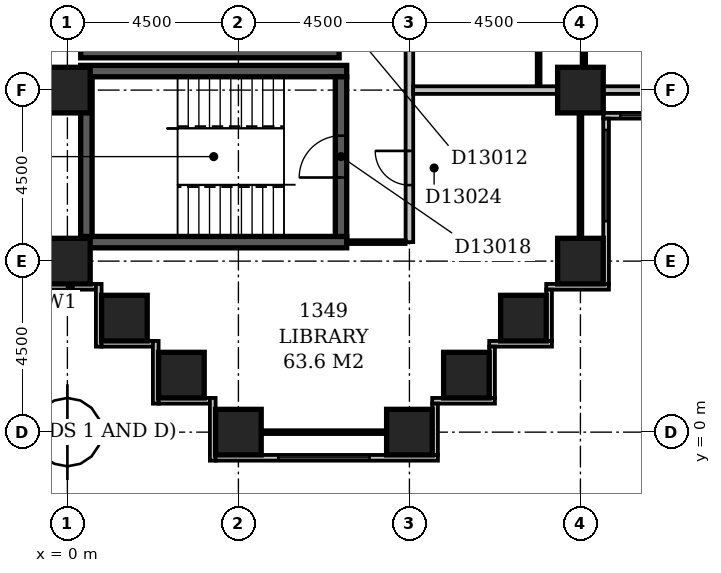
"""IFC4 building model, lengths in metres.
Left out: names, types, materials, properties, quantities, classifications, styles, units other than length and angle.
Written with IfcOpenShell. Run it as: python <this file> out.ifc"""

import sys

from ifc_helpers import new_model, si_unit, direction, frame, frame_2d, origin, origin_2d, place, context, subcontext, project, spatial, rectangle, extrude, element, fill, save


model = new_model("IFC4")
c1 = context("Model", 3, precision=1e-05, world=origin(), true_north=direction((0.0, 1.0)))
c2 = subcontext(c1, "Body", "Model", "MODEL_VIEW")
j1 = project(units=[si_unit("LENGTHUNIT", "METRE"), si_unit("PLANEANGLEUNIT", "RADIAN")], contexts=[c1])
p1 = place(None, origin())
s1 = spatial("IfcSite", under=j1, at=p1, CompositionType="ELEMENT")
p2 = place(p1, origin())
s2 = spatial("IfcBuilding", under=s1, at=p2, CompositionType="ELEMENT")
p3 = place(p2, frame((0.0, 0.0, 57.8)))
s3 = spatial("IfcBuildingStorey", under=s2, at=p3, CompositionType="ELEMENT", Elevation=57.8)
for number, where, z_axis, x_axis in (
    (1, (0.35, 5.0, -0.3), (0.0, 0.0, 1.0), (1.0, 0.0, 0.0)),
    (2, (0.35, 9.5, -0.3), (0.0, 0.0, 1.0), (1.0, 0.0, 0.0)),
):
    element("IfcWall", number, at=place(p3, frame(where, z_axis=z_axis, x_axis=x_axis)), inside=s3, PredefinedType="SHEAR", context=c2, shape_type="SweptSolid", body=[
        extrude(rectangle(XDim=7.0, YDim=0.3, at=frame_2d((3.5, 0.0))), origin(), (0.0, 0.0, 1.0), 3.6),
    ])
p4 = place(p3, frame((0.35, 10.0, -0.3), z_axis=(0.0, 0.0, 1.0), x_axis=(1.0, 0.0, 0.0)))
e3 = element("IfcWall", 3, at=p4, inside=s3, PredefinedType="SHEAR", context=c2, shape_type="SweptSolid", body=[
    extrude(rectangle(XDim=6.8, YDim=0.3, at=frame_2d((3.4, 0.0))), origin(), (0.0, 0.0, 1.0), 3.6),
])
p5 = place(p3, frame((0.5, 5.15, -0.3), z_axis=(0.0, 0.0, 1.0), x_axis=(0.0, 1.0, 0.0)))
e4 = element("IfcWall", 4, at=p5, inside=s3, PredefinedType="SHEAR", context=c2, shape_type="SweptSolid", body=[
    extrude(rectangle(XDim=4.2, YDim=0.3, at=frame_2d((2.1, 0.0))), origin(), (0.0, 0.0, 1.0), 3.6),
])
p6 = place(p3, frame((7.2, 5.15, -0.3), z_axis=(0.0, 0.0, 1.0), x_axis=(0.0, 1.0, 0.0)))
e5 = element("IfcWall", 5, at=p6, inside=s3, PredefinedType="SHEAR", context=c2, shape_type="SweptSolid", body=[
    extrude(rectangle(XDim=4.2, YDim=0.3, at=frame_2d((2.1, 0.0))), origin(), (0.0, 0.0, 1.0), 3.6),
])
p7 = place(p6, frame((1.55, 0.0, 0.3)))
e6 = element("IfcOpeningElement", 6, at=p7, cuts=e5, PredefinedType="OPENING", context=c2, shape_type="SweptSolid", body=[
    extrude(rectangle(XDim=1.1, YDim=2.1, at=frame_2d((0.55, 1.05))), frame((0.0, 0.162, 0.0), z_axis=(0.0, -1.0, 0.0), x_axis=(1.0, 0.0, 0.0)), (0.0, 0.0, 1.0), 0.324),
])
for number, where, z_axis, x_axis in (
    (7, (4.5, 0.0, -0.3), (0.0, 0.0, 1.0), (1.0, 0.0, 0.0)),
    (8, (9.0, 0.0, -0.3), (0.0, 0.0, 1.0), (1.0, 0.0, 0.0)),
    (9, (3.0, 1.5, -0.3), (0.0, 0.0, 1.0), (1.0, 0.0, 0.0)),
    (10, (10.5, 1.5, -0.3), (0.0, 0.0, 1.0), (1.0, 0.0, 0.0)),
    (11, (1.5, 3.0, -0.3), (0.0, 0.0, 1.0), (1.0, 0.0, 0.0)),
    (12, (12.0, 3.0, -0.3), (0.0, 0.0, 1.0), (1.0, 0.0, 0.0)),
    (13, (0.0, 4.5, -0.3), (0.0, 0.0, 1.0), (1.0, 0.0, 0.0)),
    (14, (13.5, 4.5, -0.3), (0.0, 0.0, 1.0), (1.0, 0.0, 0.0)),
    (15, (0.0, 9.0, -0.3), (0.0, 0.0, 1.0), (1.0, 0.0, 0.0)),
    (16, (13.5, 9.0, -0.3), (0.0, 0.0, 1.0), (1.0, 0.0, 0.0)),
):
    element("IfcColumn", number, at=place(p3, frame(where, z_axis=z_axis, x_axis=x_axis)), inside=s3, PredefinedType="COLUMN", context=c2, shape_type="SweptSolid", body=[
        extrude(rectangle(XDim=1.2, YDim=1.2, at=origin_2d()), origin(), (0.0, 0.0, 1.0), 3.6),
    ])
p8 = place(p3, frame((9.675, -0.6, 0.0), z_axis=(0.0, 0.0, 1.0), x_axis=(0.0, 1.0, 0.0)))
e17 = element("IfcWall", 17, at=p8, inside=s3, PredefinedType="STANDARD", context=c2, shape_type="SweptSolid", body=[
    extrude(rectangle(XDim=1.35, YDim=0.15, at=frame_2d((0.675, 0.0))), origin(), (0.0, 0.0, 1.0), 2.7),
])
p9 = place(p3, frame((9.6, 0.825, 0.0), z_axis=(0.0, 0.0, 1.0), x_axis=(1.0, 0.0, 0.0)))
e18 = element("IfcWall", 18, at=p9, inside=s3, PredefinedType="STANDARD", context=c2, shape_type="SweptSolid", body=[
    extrude(rectangle(XDim=1.65, YDim=0.15, at=frame_2d((0.825, 0.0))), origin(), (0.0, 0.0, 1.0), 2.7),
])
p10 = place(p3, frame((11.175, 0.9, 0.0), z_axis=(0.0, 0.0, 1.0), x_axis=(0.0, 1.0, 0.0)))
e19 = element("IfcWall", 19, at=p10, inside=s3, PredefinedType="STANDARD", context=c2, shape_type="SweptSolid", body=[
    extrude(rectangle(XDim=1.35, YDim=0.15, at=frame_2d((0.675, 0.0))), origin(), (0.0, 0.0, 1.0), 2.7),
])
p11 = place(p3, frame((11.1, 2.325, 0.0), z_axis=(0.0, 0.0, 1.0), x_axis=(1.0, 0.0, 0.0)))
e20 = element("IfcWall", 20, at=p11, inside=s3, PredefinedType="STANDARD", context=c2, shape_type="SweptSolid", body=[
    extrude(rectangle(XDim=1.65, YDim=0.15, at=frame_2d((0.825, 0.0))), origin(), (0.0, 0.0, 1.0), 2.7),
])
p12 = place(p3, frame((12.675, 2.4, 0.0), z_axis=(0.0, 0.0, 1.0), x_axis=(0.0, 1.0, 0.0)))
e21 = element("IfcWall", 21, at=p12, inside=s3, PredefinedType="STANDARD", context=c2, shape_type="SweptSolid", body=[
    extrude(rectangle(XDim=1.35, YDim=0.15, at=frame_2d((0.675, 0.0))), origin(), (0.0, 0.0, 1.0), 2.7),
])
p13 = place(p3, frame((12.6, 3.825, 0.0), z_axis=(0.0, 0.0, 1.0), x_axis=(1.0, 0.0, 0.0)))
e22 = element("IfcWall", 22, at=p13, inside=s3, PredefinedType="STANDARD", context=c2, shape_type="SweptSolid", body=[
    extrude(rectangle(XDim=1.65, YDim=0.15, at=frame_2d((0.825, 0.0))), origin(), (0.0, 0.0, 1.0), 2.7),
])
p14 = place(p3, frame((14.175, 3.9, 0.0), z_axis=(0.0, 0.0, 1.0), x_axis=(0.0, 1.0, 0.0)))
e23 = element("IfcWall", 23, at=p14, inside=s3, PredefinedType="STANDARD", context=c2, shape_type="SweptSolid", body=[
    extrude(rectangle(XDim=4.35, YDim=0.15, at=frame_2d((2.175, 0.0))), origin(), (0.0, 0.0, 1.0), 2.7),
])
p15 = place(p14, frame((1.65, 0.0, 0.6)))
e24 = element("IfcOpeningElement", 24, at=p15, cuts=e23, PredefinedType="OPENING", context=c2, shape_type="SweptSolid", body=[
    extrude(rectangle(XDim=2.4, YDim=1.8, at=frame_2d((1.2, 0.9))), frame((0.0, 0.087, 0.0), z_axis=(0.0, -1.0, 0.0), x_axis=(1.0, 0.0, 0.0)), (0.0, 0.0, 1.0), 0.174),
])
p16 = place(p3, frame((14.1, 8.325, 0.0), z_axis=(0.0, 0.0, 1.0), x_axis=(1.0, 0.0, 0.0)))
e25 = element("IfcWall", 25, at=p16, inside=s3, PredefinedType="STANDARD", context=c2, shape_type="SweptSolid", body=[
    extrude(rectangle(XDim=4.65, YDim=0.15, at=frame_2d((2.325, 0.0))), origin(), (0.0, 0.0, 1.0), 2.7),
])
p17 = place(p16, frame((0.45, 0.0, 0.6)))
e26 = element("IfcOpeningElement", 26, at=p17, cuts=e25, PredefinedType="OPENING", context=c2, shape_type="SweptSolid", body=[
    extrude(rectangle(XDim=2.4, YDim=1.8, at=frame_2d((1.2, 0.9))), frame((0.0, 0.087, 0.0), z_axis=(0.0, -1.0, 0.0), x_axis=(1.0, 0.0, 0.0)), (0.0, 0.0, 1.0), 0.174),
])
p18 = place(p3, frame((-0.6, 3.825, 0.0), z_axis=(0.0, 0.0, 1.0), x_axis=(1.0, 0.0, 0.0)))
e27 = element("IfcWall", 27, at=p18, inside=s3, PredefinedType="STANDARD", context=c2, shape_type="SweptSolid", body=[
    extrude(rectangle(XDim=1.35, YDim=0.15, at=frame_2d((0.675, 0.0))), origin(), (0.0, 0.0, 1.0), 2.7),
])
p19 = place(p3, frame((0.825, 3.9, 0.0), z_axis=(0.0, 0.0, 1.0), x_axis=(0.0, -1.0, 0.0)))
e28 = element("IfcWall", 28, at=p19, inside=s3, PredefinedType="STANDARD", context=c2, shape_type="SweptSolid", body=[
    extrude(rectangle(XDim=1.65, YDim=0.15, at=frame_2d((0.825, 0.0))), origin(), (0.0, 0.0, 1.0), 2.7),
])
p20 = place(p3, frame((0.9, 2.325, 0.0), z_axis=(0.0, 0.0, 1.0), x_axis=(1.0, 0.0, 0.0)))
e29 = element("IfcWall", 29, at=p20, inside=s3, PredefinedType="STANDARD", context=c2, shape_type="SweptSolid", body=[
    extrude(rectangle(XDim=1.35, YDim=0.15, at=frame_2d((0.675, 0.0))), origin(), (0.0, 0.0, 1.0), 2.7),
])
p21 = place(p3, frame((2.325, 2.4, 0.0), z_axis=(0.0, 0.0, 1.0), x_axis=(0.0, -1.0, 0.0)))
e30 = element("IfcWall", 30, at=p21, inside=s3, PredefinedType="STANDARD", context=c2, shape_type="SweptSolid", body=[
    extrude(rectangle(XDim=1.65, YDim=0.15, at=frame_2d((0.825, 0.0))), origin(), (0.0, 0.0, 1.0), 2.7),
])
p22 = place(p3, frame((2.4, 0.825, 0.0), z_axis=(0.0, 0.0, 1.0), x_axis=(1.0, 0.0, 0.0)))
e31 = element("IfcWall", 31, at=p22, inside=s3, PredefinedType="STANDARD", context=c2, shape_type="SweptSolid", body=[
    extrude(rectangle(XDim=1.35, YDim=0.15, at=frame_2d((0.675, 0.0))), origin(), (0.0, 0.0, 1.0), 2.7),
])
p23 = place(p3, frame((3.825, 0.9, 0.0), z_axis=(0.0, 0.0, 1.0), x_axis=(0.0, -1.0, 0.0)))
e32 = element("IfcWall", 32, at=p23, inside=s3, PredefinedType="STANDARD", context=c2, shape_type="SweptSolid", body=[
    extrude(rectangle(XDim=1.65, YDim=0.15, at=frame_2d((0.825, 0.0))), origin(), (0.0, 0.0, 1.0), 2.7),
])
p24 = place(p3, frame((3.9, -0.675, 0.0), z_axis=(0.0, 0.0, 1.0), x_axis=(1.0, 0.0, 0.0)))
e33 = element("IfcWall", 33, at=p24, inside=s3, PredefinedType="STANDARD", context=c2, shape_type="SweptSolid", body=[
    extrude(rectangle(XDim=5.85, YDim=0.15, at=frame_2d((2.925, 0.0))), origin(), (0.0, 0.0, 1.0), 2.7),
])
p25 = place(p24, frame((1.65, 0.0, 0.6)))
e34 = element("IfcOpeningElement", 34, at=p25, cuts=e33, PredefinedType="OPENING", context=c2, shape_type="SweptSolid", body=[
    extrude(rectangle(XDim=2.4, YDim=1.8, at=frame_2d((1.2, 0.9))), frame((0.0, 0.087, 0.0), z_axis=(0.0, -1.0, 0.0), x_axis=(1.0, 0.0, 0.0)), (0.0, 0.0, 1.0), 0.174),
])
p26 = place(p3, frame((5.1, 0.0, 0.0), z_axis=(0.0, 0.0, 1.0), x_axis=(1.0, 0.0, 0.0)))
e35 = element("IfcWall", 35, at=p26, inside=s3, PredefinedType="PARTITIONING", context=c2, shape_type="SweptSolid", body=[
    extrude(rectangle(XDim=3.3, YDim=0.1, at=frame_2d((1.65, 0.0))), origin(), (0.0, 0.0, 1.0), 2.7),
])
p27 = place(p3, frame((0.0, 4.4, 0.0), z_axis=(0.0, 0.0, 1.0), x_axis=(0.0, 1.0, 0.0)))
e36 = element("IfcWall", 36, at=p27, inside=s3, PredefinedType="PARTITIONING", context=c2, shape_type="SweptSolid", body=[
    extrude(rectangle(XDim=0.7, YDim=0.1, at=frame_2d((0.35, 0.0))), origin(), (0.0, 0.0, 1.0), 2.7),
])
p28 = place(p3, frame((7.349, 5.0, 0.0), z_axis=(0.0, 0.0, 1.0), x_axis=(1.0, 0.0, 0.0)))
e37 = element("IfcWall", 37, at=p28, inside=s3, PredefinedType="PARTITIONING", context=c2, shape_type="SweptSolid", body=[
    extrude(rectangle(XDim=1.551, YDim=0.1, at=frame_2d((0.775, 0.0))), origin(), (0.0, 0.0, 1.0), 3.3),
])
p29 = place(p3, frame((9.0, 5.0, 0.0), z_axis=(0.0, 0.0, 1.0), x_axis=(0.0, 1.0, 0.0)))
e38 = element("IfcWall", 38, at=p29, inside=s3, PredefinedType="PARTITIONING", context=c2, shape_type="SweptSolid", body=[
    extrude(rectangle(XDim=44.5, YDim=0.2, at=frame_2d((22.25, 0.0))), origin(), (0.0, 0.0, 1.0), 3.3),
])
p30 = place(p29, frame((28.05, 0.0, 0.0)))
e39 = element("IfcOpeningElement", 39, at=p30, cuts=e38, PredefinedType="OPENING", context=c2, shape_type="SweptSolid", body=[
    extrude(rectangle(XDim=1.0, YDim=2.1, at=frame_2d((0.5, 1.05))), frame((0.0, 0.112, 0.0), z_axis=(0.0, -1.0, 0.0), x_axis=(1.0, 0.0, 0.0)), (0.0, 0.0, 1.0), 0.224),
])
p31 = place(p29, frame((23.95, 0.0, 0.0)))
e40 = element("IfcOpeningElement", 40, at=p31, cuts=e38, PredefinedType="OPENING", context=c2, shape_type="SweptSolid", body=[
    extrude(rectangle(XDim=1.0, YDim=2.1, at=frame_2d((0.5, 1.05))), frame((0.0, 0.112, 0.0), z_axis=(0.0, -1.0, 0.0), x_axis=(1.0, 0.0, 0.0)), (0.0, 0.0, 1.0), 0.224),
])
p32 = place(p29, frame((18.3, 0.0, 0.0)))
e41 = element("IfcOpeningElement", 41, at=p32, cuts=e38, PredefinedType="OPENING", context=c2, shape_type="SweptSolid", body=[
    extrude(rectangle(XDim=1.0, YDim=2.1, at=frame_2d((0.5, 1.05))), frame((0.0, 0.112, 0.0), z_axis=(0.0, -1.0, 0.0), x_axis=(1.0, 0.0, 0.0)), (0.0, 0.0, 1.0), 0.224),
])
p33 = place(p29, frame((9.3, 0.0, 0.0)))
e42 = element("IfcOpeningElement", 42, at=p33, cuts=e38, PredefinedType="OPENING", context=c2, shape_type="SweptSolid", body=[
    extrude(rectangle(XDim=1.0, YDim=2.1, at=frame_2d((0.5, 1.05))), frame((0.0, 0.112, 0.0), z_axis=(0.0, -1.0, 0.0), x_axis=(1.0, 0.0, 0.0)), (0.0, 0.0, 1.0), 0.224),
])
p34 = place(p29, frame((32.75, 0.0, 0.0)))
e43 = element("IfcOpeningElement", 43, at=p34, cuts=e38, PredefinedType="OPENING", context=c2, shape_type="SweptSolid", body=[
    extrude(rectangle(XDim=0.9, YDim=2.1, at=frame_2d((0.45, 1.05))), frame((0.0, 0.112, 0.0), z_axis=(0.0, -1.0, 0.0), x_axis=(1.0, 0.0, 0.0)), (0.0, 0.0, 1.0), 0.224),
])
p35 = place(p29, frame((1.5, 0.0, 0.0)))
e44 = element("IfcOpeningElement", 44, at=p35, cuts=e38, PredefinedType="OPENING", context=c2, shape_type="SweptSolid", body=[
    extrude(rectangle(XDim=0.9, YDim=2.1, at=frame_2d((0.45, 1.05))), frame((0.0, 0.112, 0.0), z_axis=(0.0, -1.0, 0.0), x_axis=(1.0, 0.0, 0.0)), (0.0, 0.0, 1.0), 0.224),
])
p36 = place(p3, frame((13.5, 5.1, 0.0), z_axis=(0.0, 0.0, 1.0), x_axis=(0.0, 1.0, 0.0)))
e45 = element("IfcWall", 45, at=p36, inside=s3, PredefinedType="PARTITIONING", context=c2, shape_type="SweptSolid", body=[
    extrude(rectangle(XDim=3.3, YDim=0.1, at=frame_2d((1.65, 0.0))), origin(), (0.0, 0.0, 1.0), 2.7),
])
p37 = place(p3, frame((9.1, 9.0, 0.0), z_axis=(0.0, 0.0, 1.0), x_axis=(1.0, 0.0, 0.0)))
e46 = element("IfcWall", 46, at=p37, inside=s3, PredefinedType="PARTITIONING", context=c2, shape_type="SweptSolid", body=[
    extrude(rectangle(XDim=3.8, YDim=0.2, at=frame_2d((1.9, 0.0))), origin(), (0.0, 0.0, 1.0), 3.3),
])
p38 = place(p3, frame((14.1, 9.0, 0.0), z_axis=(0.0, 0.0, 1.0), x_axis=(1.0, 0.0, 0.0)))
e47 = element("IfcWall", 47, at=p38, inside=s3, PredefinedType="PARTITIONING", context=c2, shape_type="SweptSolid", body=[
    extrude(rectangle(XDim=3.3, YDim=0.2, at=frame_2d((1.65, 0.0))), origin(), (0.0, 0.0, 1.0), 2.7),
])
p39 = place(p3, frame((12.4, 9.1, 0.0), z_axis=(0.0, 0.0, 1.0), x_axis=(0.0, 1.0, 0.0)))
e48 = element("IfcWall", 48, at=p39, inside=s3, PredefinedType="PARTITIONING", context=c2, shape_type="SweptSolid", body=[
    extrude(rectangle(XDim=4.9, YDim=0.1, at=frame_2d((2.45, 0.0))), origin(), (0.0, 0.0, 1.0), 3.3),
])
p40 = place(p39, frame((1.95, 0.0, 0.0)))
e49 = element("IfcOpeningElement", 49, at=p40, cuts=e48, PredefinedType="OPENING", context=c2, shape_type="SweptSolid", body=[
    extrude(rectangle(XDim=0.9, YDim=2.1, at=frame_2d((0.45, 1.05))), frame((0.0, 0.062, 0.0), z_axis=(0.0, -1.0, 0.0), x_axis=(1.0, 0.0, 0.0)), (0.0, 0.0, 1.0), 0.124),
])
p41 = place(p3, frame((13.6, 9.6, 0.0), z_axis=(0.0, 0.0, 1.0), x_axis=(0.0, 1.0, 0.0)))
e50 = element("IfcWall", 50, at=p41, inside=s3, PredefinedType="PARTITIONING", context=c2, shape_type="SweptSolid", body=[
    extrude(rectangle(XDim=8.3, YDim=0.1, at=frame_2d((4.15, 0.0))), origin(), (0.0, 0.0, 1.0), 3.3),
])
p42 = place(p41, frame((1.2, 0.0, 0.0)))
e51 = element("IfcOpeningElement", 51, at=p42, cuts=e50, PredefinedType="OPENING", context=c2, shape_type="SweptSolid", body=[
    extrude(rectangle(XDim=0.9, YDim=2.1, at=frame_2d((0.45, 1.05))), frame((0.0, 0.062, 0.0), z_axis=(0.0, -1.0, 0.0), x_axis=(1.0, 0.0, 0.0)), (0.0, 0.0, 1.0), 0.124),
])
p43 = place(p41, frame((5.7, 0.0, 0.0)))
e52 = element("IfcOpeningElement", 52, at=p43, cuts=e50, PredefinedType="OPENING", context=c2, shape_type="SweptSolid", body=[
    extrude(rectangle(XDim=0.9, YDim=2.1, at=frame_2d((0.45, 1.05))), frame((0.0, 0.062, 0.0), z_axis=(0.0, -1.0, 0.0), x_axis=(1.0, 0.0, 0.0)), (0.0, 0.0, 1.0), 0.124),
])
p44 = place(p15, origin())
e53 = element("IfcWindow", 53, at=p44, inside=s3, PartitioningType="SINGLE_PANEL", PredefinedType="WINDOW", context=c2, shape_type="SweptSolid", body=[
    extrude(rectangle(XDim=2.4, YDim=1.8, at=frame_2d((1.2, 0.9))), frame((0.0, 0.03, 0.0), z_axis=(0.0, -1.0, 0.0), x_axis=(1.0, 0.0, 0.0)), (0.0, 0.0, 1.0), 0.06),
])
fill(e24, e53)
p45 = place(p17, origin())
e54 = element("IfcWindow", 54, at=p45, inside=s3, PartitioningType="SINGLE_PANEL", PredefinedType="WINDOW", context=c2, shape_type="SweptSolid", body=[
    extrude(rectangle(XDim=2.4, YDim=1.8, at=frame_2d((1.2, 0.9))), frame((0.0, 0.03, 0.0), z_axis=(0.0, -1.0, 0.0), x_axis=(1.0, 0.0, 0.0)), (0.0, 0.0, 1.0), 0.06),
])
fill(e26, e54)
p46 = place(p25, origin())
e55 = element("IfcWindow", 55, at=p46, inside=s3, PartitioningType="SINGLE_PANEL", PredefinedType="WINDOW", context=c2, shape_type="SweptSolid", body=[
    extrude(rectangle(XDim=2.4, YDim=1.8, at=frame_2d((1.2, 0.9))), frame((0.0, 0.03, 0.0), z_axis=(0.0, -1.0, 0.0), x_axis=(1.0, 0.0, 0.0)), (0.0, 0.0, 1.0), 0.06),
])
fill(e34, e55)
p47 = place(p7, origin())
e56 = element("IfcDoor", 56, at=p47, inside=s3, OperationType="SINGLE_SWING_LEFT", PredefinedType="DOOR", context=c2, shape_type="SweptSolid", body=[
    extrude(rectangle(XDim=1.1, YDim=2.1, at=frame_2d((0.55, 1.05))), frame((0.0, 0.025, 0.0), z_axis=(0.0, -1.0, 0.0), x_axis=(1.0, 0.0, 0.0)), (0.0, 0.0, 1.0), 0.05),
])
fill(e6, e56)
p48 = place(p35, frame((0.9, 0.0, 0.0), z_axis=(0.0, 0.0, 1.0), x_axis=(-1.0, 0.0, 0.0)))
e57 = element("IfcDoor", 57, at=p48, inside=s3, OperationType="SINGLE_SWING_LEFT", PredefinedType="DOOR", context=c2, shape_type="SweptSolid", body=[
    extrude(rectangle(XDim=0.9, YDim=2.1, at=frame_2d((0.45, 1.05))), frame((0.0, 0.025, 0.0), z_axis=(0.0, -1.0, 0.0), x_axis=(1.0, 0.0, 0.0)), (0.0, 0.0, 1.0), 0.05),
])
fill(e44, e57)
save(model, sys.argv[1])
